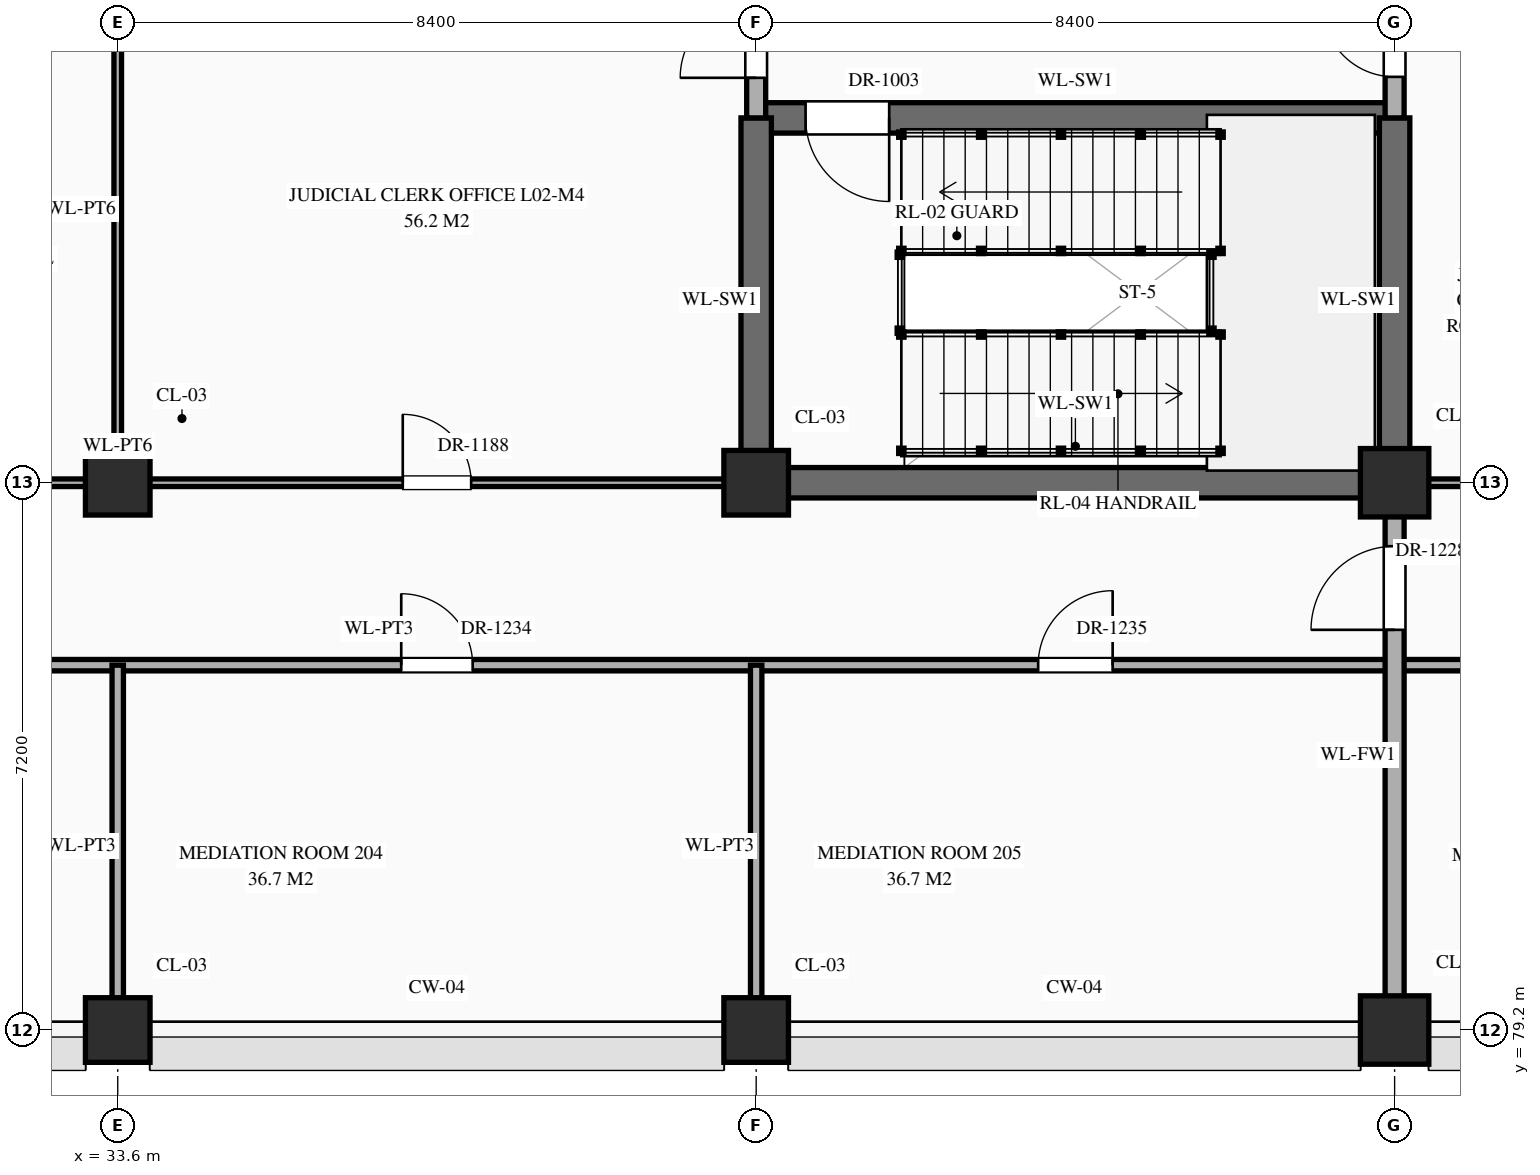
"""IFC4 building model, lengths in metres.
Left out: names, types, materials, properties, quantities, classifications, styles, units other than length and angle.
Written with IfcOpenShell. Run it as: python <this file> out.ifc"""

import sys

from ifc_helpers import new_model, si_unit, direction, frame, frame_2d, origin, origin_2d, place, context, subcontext, project, spatial, rectangle, extrude, element, fill, save


model = new_model("IFC4")
c1 = context("Model", 3, precision=1e-05, world=origin(), true_north=direction((0.0, 1.0)))
c2 = subcontext(c1, "Body", "Model", "MODEL_VIEW")
j1 = project(units=[si_unit("LENGTHUNIT", "METRE"), si_unit("PLANEANGLEUNIT", "RADIAN")], contexts=[c1])
p1 = place(None, origin())
s1 = spatial("IfcSite", under=j1, at=p1, CompositionType="ELEMENT")
p2 = place(p1, origin())
s2 = spatial("IfcBuilding", under=s1, at=p2, CompositionType="ELEMENT")
p3 = place(p2, frame((0.0, 0.0, 5.4)))
s3 = spatial("IfcBuildingStorey", under=s2, at=p3, CompositionType="ELEMENT", Elevation=5.4)
for number, where, z_axis, x_axis in (
    (1, (33.6, 79.2, 0.0), (0.0, 0.0, 1.0), (1.0, 0.0, 0.0)),
    (2, (33.6, 86.4, 0.0), (0.0, 0.0, 1.0), (1.0, 0.0, 0.0)),
    (3, (42.0, 79.2, 0.0), (0.0, 0.0, 1.0), (1.0, 0.0, 0.0)),
    (4, (42.0, 86.4, 0.0), (0.0, 0.0, 1.0), (1.0, 0.0, 0.0)),
):
    element("IfcColumn", number, at=place(p3, frame(where, z_axis=z_axis, x_axis=x_axis)), inside=s3, PredefinedType="COLUMN", context=c2, shape_type="SweptSolid", body=[
        extrude(rectangle(XDim=0.85, YDim=0.85, at=origin_2d()), origin(), (0.0, 0.0, 1.0), 5.4),
    ])
for number, where, z_axis, x_axis in (
    (5, (50.4, 79.2, 0.0), (0.0, 0.0, 1.0), (1.0, 0.0, 0.0)),
    (6, (50.4, 86.4, 0.0), (0.0, 0.0, 1.0), (1.0, 0.0, 0.0)),
):
    element("IfcColumn", number, at=place(p3, frame(where, z_axis=z_axis, x_axis=x_axis)), inside=s3, PredefinedType="COLUMN", context=c2, shape_type="SweptSolid", body=[
        extrude(rectangle(XDim=0.9, YDim=0.9, at=origin_2d()), origin(), (0.0, 0.0, 1.0), 5.4),
    ])
p4 = place(p3, frame((16.8, 84.0, 0.0), z_axis=(0.0, 0.0, 1.0), x_axis=(1.0, 0.0, 0.0)))
e7 = element("IfcWall", 7, at=p4, inside=s3, PredefinedType="STANDARD", context=c2, shape_type="SweptSolid", body=[
    extrude(rectangle(XDim=134.4, YDim=0.15, at=frame_2d((67.2, 0.0))), origin(), (0.0, 0.0, 1.0), 5.12),
])
p5 = place(p4, frame((3.58, 0.0, 0.0)))
e8 = element("IfcOpeningElement", 8, at=p5, cuts=e7, PredefinedType="OPENING", context=c2, shape_type="SweptSolid", body=[
    extrude(rectangle(XDim=1.24, YDim=2.3, at=frame_2d((0.62, 1.15))), frame((0.0, 0.087, 0.0), z_axis=(0.0, -1.0, 0.0), x_axis=(1.0, 0.0, 0.0)), (0.0, 0.0, 1.0), 0.174),
])
p6 = place(p4, frame((11.96, 0.0, 0.0)))
e9 = element("IfcOpeningElement", 9, at=p6, cuts=e7, PredefinedType="OPENING", context=c2, shape_type="SweptSolid", body=[
    extrude(rectangle(XDim=1.28, YDim=2.35, at=frame_2d((0.64, 1.175))), frame((0.0, 0.087, 0.0), z_axis=(0.0, -1.0, 0.0), x_axis=(1.0, 0.0, 0.0)), (0.0, 0.0, 1.0), 0.174),
])
p7 = place(p4, frame((20.53, 0.0, 0.0)))
e10 = element("IfcOpeningElement", 10, at=p7, cuts=e7, PredefinedType="OPENING", context=c2, shape_type="SweptSolid", body=[
    extrude(rectangle(XDim=0.94, YDim=2.3, at=frame_2d((0.47, 1.15))), frame((0.0, 0.087, 0.0), z_axis=(0.0, -1.0, 0.0), x_axis=(1.0, 0.0, 0.0)), (0.0, 0.0, 1.0), 0.174),
])
p8 = place(p4, frame((28.91, 0.0, 0.0)))
e11 = element("IfcOpeningElement", 11, at=p8, cuts=e7, PredefinedType="OPENING", context=c2, shape_type="SweptSolid", body=[
    extrude(rectangle(XDim=0.98, YDim=2.35, at=frame_2d((0.49, 1.175))), frame((0.0, 0.087, 0.0), z_axis=(0.0, -1.0, 0.0), x_axis=(1.0, 0.0, 0.0)), (0.0, 0.0, 1.0), 0.174),
])
p9 = place(p4, frame((37.27, 0.0, 0.0)))
e12 = element("IfcOpeningElement", 12, at=p9, cuts=e7, PredefinedType="OPENING", context=c2, shape_type="SweptSolid", body=[
    extrude(rectangle(XDim=1.06, YDim=2.4, at=frame_2d((0.53, 1.2))), frame((0.0, 0.087, 0.0), z_axis=(0.0, -1.0, 0.0), x_axis=(1.0, 0.0, 0.0)), (0.0, 0.0, 1.0), 0.174),
])
p10 = place(p4, frame((45.63, 0.0, 0.0)))
e13 = element("IfcOpeningElement", 13, at=p10, cuts=e7, PredefinedType="OPENING", context=c2, shape_type="SweptSolid", body=[
    extrude(rectangle(XDim=1.14, YDim=2.4, at=frame_2d((0.57, 1.2))), frame((0.0, 0.087, 0.0), z_axis=(0.0, -1.0, 0.0), x_axis=(1.0, 0.0, 0.0)), (0.0, 0.0, 1.0), 0.174),
])
p11 = place(p4, frame((54.15, 0.0, 0.0)))
e14 = element("IfcOpeningElement", 14, at=p11, cuts=e7, PredefinedType="OPENING", context=c2, shape_type="SweptSolid", body=[
    extrude(rectangle(XDim=0.9, YDim=2.15, at=frame_2d((0.45, 1.075))), frame((0.0, 0.087, 0.0), z_axis=(0.0, -1.0, 0.0), x_axis=(1.0, 0.0, 0.0)), (0.0, 0.0, 1.0), 0.174),
])
p12 = place(p4, frame((62.57, 0.0, 0.0)))
e15 = element("IfcOpeningElement", 15, at=p12, cuts=e7, PredefinedType="OPENING", context=c2, shape_type="SweptSolid", body=[
    extrude(rectangle(XDim=0.86, YDim=2.1, at=frame_2d((0.43, 1.05))), frame((0.0, 0.087, 0.0), z_axis=(0.0, -1.0, 0.0), x_axis=(1.0, 0.0, 0.0)), (0.0, 0.0, 1.0), 0.174),
])
p13 = place(p4, frame((70.92, 0.0, 0.0)))
e16 = element("IfcOpeningElement", 16, at=p13, cuts=e7, PredefinedType="OPENING", context=c2, shape_type="SweptSolid", body=[
    extrude(rectangle(XDim=0.96, YDim=2.2, at=frame_2d((0.48, 1.1))), frame((0.0, 0.087, 0.0), z_axis=(0.0, -1.0, 0.0), x_axis=(1.0, 0.0, 0.0)), (0.0, 0.0, 1.0), 0.174),
])
p14 = place(p4, frame((79.3, 0.0, 0.0)))
e17 = element("IfcOpeningElement", 17, at=p14, cuts=e7, PredefinedType="OPENING", context=c2, shape_type="SweptSolid", body=[
    extrude(rectangle(XDim=1.0, YDim=2.25, at=frame_2d((0.5, 1.125))), frame((0.0, 0.087, 0.0), z_axis=(0.0, -1.0, 0.0), x_axis=(1.0, 0.0, 0.0)), (0.0, 0.0, 1.0), 0.174),
])
p15 = place(p4, frame((87.68, 0.0, 0.0)))
e18 = element("IfcOpeningElement", 18, at=p15, cuts=e7, PredefinedType="OPENING", context=c2, shape_type="SweptSolid", body=[
    extrude(rectangle(XDim=1.04, YDim=2.2, at=frame_2d((0.52, 1.1))), frame((0.0, 0.087, 0.0), z_axis=(0.0, -1.0, 0.0), x_axis=(1.0, 0.0, 0.0)), (0.0, 0.0, 1.0), 0.174),
])
p16 = place(p4, frame((96.06, 0.0, 0.0)))
e19 = element("IfcOpeningElement", 19, at=p16, cuts=e7, PredefinedType="OPENING", context=c2, shape_type="SweptSolid", body=[
    extrude(rectangle(XDim=1.08, YDim=2.25, at=frame_2d((0.54, 1.125))), frame((0.0, 0.087, 0.0), z_axis=(0.0, -1.0, 0.0), x_axis=(1.0, 0.0, 0.0)), (0.0, 0.0, 1.0), 0.174),
])
p17 = place(p4, frame((104.44, 0.0, 0.0)))
e20 = element("IfcOpeningElement", 20, at=p17, cuts=e7, PredefinedType="OPENING", context=c2, shape_type="SweptSolid", body=[
    extrude(rectangle(XDim=1.12, YDim=2.25, at=frame_2d((0.56, 1.125))), frame((0.0, 0.087, 0.0), z_axis=(0.0, -1.0, 0.0), x_axis=(1.0, 0.0, 0.0)), (0.0, 0.0, 1.0), 0.174),
])
p18 = place(p4, frame((112.82, 0.0, 0.0)))
e21 = element("IfcOpeningElement", 21, at=p18, cuts=e7, PredefinedType="OPENING", context=c2, shape_type="SweptSolid", body=[
    extrude(rectangle(XDim=1.16, YDim=2.3, at=frame_2d((0.58, 1.15))), frame((0.0, 0.087, 0.0), z_axis=(0.0, -1.0, 0.0), x_axis=(1.0, 0.0, 0.0)), (0.0, 0.0, 1.0), 0.174),
])
p19 = place(p4, frame((121.2, 0.0, 0.0)))
e22 = element("IfcOpeningElement", 22, at=p19, cuts=e7, PredefinedType="OPENING", context=c2, shape_type="SweptSolid", body=[
    extrude(rectangle(XDim=1.2, YDim=2.35, at=frame_2d((0.6, 1.175))), frame((0.0, 0.087, 0.0), z_axis=(0.0, -1.0, 0.0), x_axis=(1.0, 0.0, 0.0)), (0.0, 0.0, 1.0), 0.174),
])
p20 = place(p4, frame((129.58, 0.0, 0.0)))
e23 = element("IfcOpeningElement", 23, at=p20, cuts=e7, PredefinedType="OPENING", context=c2, shape_type="SweptSolid", body=[
    extrude(rectangle(XDim=1.24, YDim=2.3, at=frame_2d((0.62, 1.15))), frame((0.0, 0.087, 0.0), z_axis=(0.0, -1.0, 0.0), x_axis=(1.0, 0.0, 0.0)), (0.0, 0.0, 1.0), 0.174),
])
p21 = place(p3, frame((25.2, 86.4, 0.0), z_axis=(0.0, 0.0, 1.0), x_axis=(1.0, 0.0, 0.0)))
e24 = element("IfcWall", 24, at=p21, inside=s3, PredefinedType="STANDARD", context=c2, shape_type="SweptSolid", body=[
    extrude(rectangle(XDim=16.8, YDim=0.1, at=frame_2d((8.4, 0.0))), origin(), (0.0, 0.0, 1.0), 4.27),
])
p22 = place(p21, frame((1.083, 0.0, 0.0)))
e25 = element("IfcOpeningElement", 25, at=p22, cuts=e24, PredefinedType="OPENING", context=c2, shape_type="SweptSolid", body=[
    extrude(rectangle(XDim=0.98, YDim=2.35, at=frame_2d((0.49, 1.175))), frame((0.0, 0.062, 0.0), z_axis=(0.0, -1.0, 0.0), x_axis=(1.0, 0.0, 0.0)), (0.0, 0.0, 1.0), 0.124),
])
p23 = place(p21, frame((3.3, 0.0, 0.0)))
e26 = element("IfcOpeningElement", 26, at=p23, cuts=e24, PredefinedType="OPENING", context=c2, shape_type="SweptSolid", body=[
    extrude(rectangle(XDim=1.8, YDim=2.5, at=frame_2d((0.9, 1.25))), frame((0.0, 0.062, 0.0), z_axis=(0.0, -1.0, 0.0), x_axis=(1.0, 0.0, 0.0)), (0.0, 0.0, 1.0), 0.124),
])
p24 = place(p21, frame((6.258, 0.0, 0.0)))
e27 = element("IfcOpeningElement", 27, at=p24, cuts=e24, PredefinedType="OPENING", context=c2, shape_type="SweptSolid", body=[
    extrude(rectangle(XDim=1.14, YDim=2.4, at=frame_2d((0.57, 1.2))), frame((0.0, 0.062, 0.0), z_axis=(0.0, -1.0, 0.0), x_axis=(1.0, 0.0, 0.0)), (0.0, 0.0, 1.0), 0.124),
])
p25 = place(p21, frame((12.15, 0.0, 0.0)))
e28 = element("IfcOpeningElement", 28, at=p25, cuts=e24, PredefinedType="OPENING", context=c2, shape_type="SweptSolid", body=[
    extrude(rectangle(XDim=0.9, YDim=2.15, at=frame_2d((0.45, 1.075))), frame((0.0, 0.062, 0.0), z_axis=(0.0, -1.0, 0.0), x_axis=(1.0, 0.0, 0.0)), (0.0, 0.0, 1.0), 0.124),
])
p26 = place(p3, frame((42.0, 86.4, 0.0), z_axis=(0.0, 0.0, 1.0), x_axis=(1.0, 0.0, 0.0)))
e29 = element("IfcWall", 29, at=p26, inside=s3, PredefinedType="SHEAR", context=c2, shape_type="SweptSolid", body=[
    extrude(rectangle(XDim=8.4, YDim=0.4, at=frame_2d((4.2, 0.0))), origin(), (0.0, 0.0, 1.0), 5.12),
])
p27 = place(p3, frame((50.4, 86.4, 0.0), z_axis=(0.0, 0.0, 1.0), x_axis=(1.0, 0.0, 0.0)))
e30 = element("IfcWall", 30, at=p27, inside=s3, PredefinedType="STANDARD", context=c2, shape_type="SweptSolid", body=[
    extrude(rectangle(XDim=8.4, YDim=0.1, at=frame_2d((4.2, 0.0))), origin(), (0.0, 0.0, 1.0), 4.27),
])
p28 = place(p27, frame((1.125, 0.0, 0.0)))
e31 = element("IfcOpeningElement", 31, at=p28, cuts=e30, PredefinedType="OPENING", context=c2, shape_type="SweptSolid", body=[
    extrude(rectangle(XDim=0.92, YDim=2.15, at=frame_2d((0.46, 1.075))), frame((0.0, 0.062, 0.0), z_axis=(0.0, -1.0, 0.0), x_axis=(1.0, 0.0, 0.0)), (0.0, 0.0, 1.0), 0.124),
])
p29 = place(p27, frame((3.7, 0.0, 0.0)))
e32 = element("IfcOpeningElement", 32, at=p29, cuts=e30, PredefinedType="OPENING", context=c2, shape_type="SweptSolid", body=[
    extrude(rectangle(XDim=1.0, YDim=2.25, at=frame_2d((0.5, 1.125))), frame((0.0, 0.062, 0.0), z_axis=(0.0, -1.0, 0.0), x_axis=(1.0, 0.0, 0.0)), (0.0, 0.0, 1.0), 0.124),
])
p30 = place(p27, frame((6.295, 0.0, 0.0)))
e33 = element("IfcOpeningElement", 33, at=p30, cuts=e30, PredefinedType="OPENING", context=c2, shape_type="SweptSolid", body=[
    extrude(rectangle(XDim=1.04, YDim=2.2, at=frame_2d((0.52, 1.1))), frame((0.0, 0.062, 0.0), z_axis=(0.0, -1.0, 0.0), x_axis=(1.0, 0.0, 0.0)), (0.0, 0.0, 1.0), 0.124),
])
p31 = place(p3, frame((42.0, 91.2, 0.0), z_axis=(0.0, 0.0, 1.0), x_axis=(1.0, 0.0, 0.0)))
e34 = element("IfcWall", 34, at=p31, inside=s3, PredefinedType="SHEAR", context=c2, shape_type="SweptSolid", body=[
    extrude(rectangle(XDim=8.4, YDim=0.4, at=frame_2d((4.2, 0.0))), origin(), (0.0, 0.0, 1.0), 5.12),
])
p32 = place(p31, frame((0.65, 0.0, 0.0)))
e35 = element("IfcOpeningElement", 35, at=p32, cuts=e34, PredefinedType="OPENING", context=c2, shape_type="SweptSolid", body=[
    extrude(rectangle(XDim=1.1, YDim=2.2, at=frame_2d((0.55, 1.1))), frame((0.0, 0.212, 0.0), z_axis=(0.0, -1.0, 0.0), x_axis=(1.0, 0.0, 0.0)), (0.0, 0.0, 1.0), 0.424),
])
p33 = place(p3, frame((33.6, 79.24, 0.0), z_axis=(0.0, 0.0, 1.0), x_axis=(0.0, 1.0, 0.0)))
e36 = element("IfcWall", 36, at=p33, inside=s3, PredefinedType="STANDARD", context=c2, shape_type="SweptSolid", body=[
    extrude(rectangle(XDim=4.76, YDim=0.15, at=frame_2d((2.38, 0.0))), origin(), (0.0, 0.0, 1.0), 4.37),
])
p34 = place(p3, frame((33.6, 86.4, 0.0), z_axis=(0.0, 0.0, 1.0), x_axis=(0.0, 1.0, 0.0)))
e37 = element("IfcWall", 37, at=p34, inside=s3, PredefinedType="STANDARD", context=c2, shape_type="SweptSolid", body=[
    extrude(rectangle(XDim=7.2, YDim=0.1, at=frame_2d((3.6, 0.0))), origin(), (0.0, 0.0, 1.0), 4.37),
])
p35 = place(p3, frame((42.0, 79.24, 0.0), z_axis=(0.0, 0.0, 1.0), x_axis=(0.0, 1.0, 0.0)))
e38 = element("IfcWall", 38, at=p35, inside=s3, PredefinedType="STANDARD", context=c2, shape_type="SweptSolid", body=[
    extrude(rectangle(XDim=4.76, YDim=0.15, at=frame_2d((2.38, 0.0))), origin(), (0.0, 0.0, 1.0), 4.37),
])
p36 = place(p3, frame((42.0, 86.4, 0.0), z_axis=(0.0, 0.0, 1.0), x_axis=(0.0, 1.0, 0.0)))
e39 = element("IfcWall", 39, at=p36, inside=s3, PredefinedType="SHEAR", context=c2, shape_type="SweptSolid", body=[
    extrude(rectangle(XDim=4.8, YDim=0.4, at=frame_2d((2.4, 0.0))), origin(), (0.0, 0.0, 1.0), 5.12),
])
p37 = place(p3, frame((42.0, 91.2, 0.0), z_axis=(0.0, 0.0, 1.0), x_axis=(0.0, 1.0, 0.0)))
e40 = element("IfcWall", 40, at=p37, inside=s3, PredefinedType="STANDARD", context=c2, shape_type="SweptSolid", body=[
    extrude(rectangle(XDim=2.4, YDim=0.25, at=frame_2d((1.2, 0.0))), origin(), (0.0, 0.0, 1.0), 4.37),
])
p38 = place(p37, frame((0.528, 0.0, 0.0)))
e41 = element("IfcOpeningElement", 41, at=p38, cuts=e40, PredefinedType="OPENING", context=c2, shape_type="SweptSolid", body=[
    extrude(rectangle(XDim=1.0, YDim=2.2, at=frame_2d((0.5, 1.1))), frame((0.0, 0.137, 0.0), z_axis=(0.0, -1.0, 0.0), x_axis=(1.0, 0.0, 0.0)), (0.0, 0.0, 1.0), 0.274),
])
p39 = place(p3, frame((50.4, 79.24, 0.0), z_axis=(0.0, 0.0, 1.0), x_axis=(0.0, 1.0, 0.0)))
e42 = element("IfcWall", 42, at=p39, inside=s3, PredefinedType="STANDARD", context=c2, shape_type="SweptSolid", body=[
    extrude(rectangle(XDim=7.16, YDim=0.25, at=frame_2d((3.58, 0.0))), origin(), (0.0, 0.0, 1.0), 4.37),
])
p40 = place(p39, frame((5.225, 0.0, 0.0)))
e43 = element("IfcOpeningElement", 43, at=p40, cuts=e42, PredefinedType="OPENING", context=c2, shape_type="SweptSolid", body=[
    extrude(rectangle(XDim=1.1, YDim=2.2, at=frame_2d((0.55, 1.1))), frame((0.0, 0.137, 0.0), z_axis=(0.0, -1.0, 0.0), x_axis=(1.0, 0.0, 0.0)), (0.0, 0.0, 1.0), 0.274),
])
p41 = place(p3, frame((50.4, 86.4, 0.0), z_axis=(0.0, 0.0, 1.0), x_axis=(0.0, 1.0, 0.0)))
e44 = element("IfcWall", 44, at=p41, inside=s3, PredefinedType="SHEAR", context=c2, shape_type="SweptSolid", body=[
    extrude(rectangle(XDim=4.8, YDim=0.4, at=frame_2d((2.4, 0.0))), origin(), (0.0, 0.0, 1.0), 5.12),
])
p42 = place(p3, frame((50.4, 91.2, 0.0), z_axis=(0.0, 0.0, 1.0), x_axis=(0.0, 1.0, 0.0)))
e45 = element("IfcWall", 45, at=p42, inside=s3, PredefinedType="STANDARD", context=c2, shape_type="SweptSolid", body=[
    extrude(rectangle(XDim=13.2, YDim=0.25, at=frame_2d((6.6, 0.0))), origin(), (0.0, 0.0, 1.0), 4.37),
])
p43 = place(p42, frame((0.54, 0.0, 0.0)))
e46 = element("IfcOpeningElement", 46, at=p43, cuts=e45, PredefinedType="OPENING", context=c2, shape_type="SweptSolid", body=[
    extrude(rectangle(XDim=0.95, YDim=2.15, at=frame_2d((0.475, 1.075))), frame((0.0, 0.137, 0.0), z_axis=(0.0, -1.0, 0.0), x_axis=(1.0, 0.0, 0.0)), (0.0, 0.0, 1.0), 0.274),
])
p44 = place(p42, frame((10.51, 0.0, 0.0)))
e47 = element("IfcOpeningElement", 47, at=p44, cuts=e45, PredefinedType="OPENING", context=c2, shape_type="SweptSolid", body=[
    extrude(rectangle(XDim=0.95, YDim=2.15, at=frame_2d((0.475, 1.075))), frame((0.0, 0.137, 0.0), z_axis=(0.0, -1.0, 0.0), x_axis=(1.0, 0.0, 0.0)), (0.0, 0.0, 1.0), 0.274),
])
p45 = place(p42, frame((3.285, 0.0, 0.0)))
e48 = element("IfcOpeningElement", 48, at=p45, cuts=e45, PredefinedType="OPENING", context=c2, shape_type="SweptSolid", body=[
    extrude(rectangle(XDim=1.0, YDim=2.2, at=frame_2d((0.5, 1.1))), frame((0.0, 0.137, 0.0), z_axis=(0.0, -1.0, 0.0), x_axis=(1.0, 0.0, 0.0)), (0.0, 0.0, 1.0), 0.274),
])
p46 = place(p32, frame((1.1, 0.0, 0.0), z_axis=(0.0, 0.0, 1.0), x_axis=(-1.0, 0.0, 0.0)))
e49 = element("IfcDoor", 49, at=p46, inside=s3, OperationType="SINGLE_SWING_LEFT", PredefinedType="DOOR", context=c2, shape_type="SweptSolid", body=[
    extrude(rectangle(XDim=1.1, YDim=2.2, at=frame_2d((0.55, 1.1))), frame((0.0, 0.025, 0.0), z_axis=(0.0, -1.0, 0.0), x_axis=(1.0, 0.0, 0.0)), (0.0, 0.0, 1.0), 0.05),
])
fill(e35, e49)
p47 = place(p38, origin())
e50 = element("IfcDoor", 50, at=p47, inside=s3, OperationType="SINGLE_SWING_LEFT", PredefinedType="DOOR", context=c2, shape_type="SweptSolid", body=[
    extrude(rectangle(XDim=1.0, YDim=2.2, at=frame_2d((0.5, 1.1))), frame((0.0, 0.025, 0.0), z_axis=(0.0, -1.0, 0.0), x_axis=(1.0, 0.0, 0.0)), (0.0, 0.0, 1.0), 0.05),
])
fill(e41, e50)
p48 = place(p43, origin())
e51 = element("IfcDoor", 51, at=p48, inside=s3, OperationType="SINGLE_SWING_RIGHT", PredefinedType="DOOR", context=c2, shape_type="SweptSolid", body=[
    extrude(rectangle(XDim=0.95, YDim=2.15, at=frame_2d((0.475, 1.075))), frame((0.0, 0.025, 0.0), z_axis=(0.0, -1.0, 0.0), x_axis=(1.0, 0.0, 0.0)), (0.0, 0.0, 1.0), 0.05),
])
fill(e46, e51)
p49 = place(p25, origin())
e52 = element("IfcDoor", 52, at=p49, inside=s3, OperationType="SINGLE_SWING_LEFT", PredefinedType="DOOR", context=c2, shape_type="SweptSolid", body=[
    extrude(rectangle(XDim=0.9, YDim=2.15, at=frame_2d((0.45, 1.075))), frame((0.0, 0.025, 0.0), z_axis=(0.0, -1.0, 0.0), x_axis=(1.0, 0.0, 0.0)), (0.0, 0.0, 1.0), 0.05),
])
fill(e28, e52)
p50 = place(p40, origin())
e53 = element("IfcDoor", 53, at=p50, inside=s3, OperationType="SINGLE_SWING_LEFT", PredefinedType="DOOR", context=c2, shape_type="SweptSolid", body=[
    extrude(rectangle(XDim=1.1, YDim=2.2, at=frame_2d((0.55, 1.1))), frame((0.0, 0.025, 0.0), z_axis=(0.0, -1.0, 0.0), x_axis=(1.0, 0.0, 0.0)), (0.0, 0.0, 1.0), 0.05),
])
fill(e43, e53)
p51 = place(p7, origin())
e54 = element("IfcDoor", 54, at=p51, inside=s3, OperationType="SINGLE_SWING_LEFT", PredefinedType="DOOR", context=c2, shape_type="SweptSolid", body=[
    extrude(rectangle(XDim=0.94, YDim=2.3, at=frame_2d((0.47, 1.15))), frame((0.0, 0.025, 0.0), z_axis=(0.0, -1.0, 0.0), x_axis=(1.0, 0.0, 0.0)), (0.0, 0.0, 1.0), 0.05),
])
fill(e10, e54)
p52 = place(p8, origin())
e55 = element("IfcDoor", 55, at=p52, inside=s3, OperationType="SINGLE_SWING_RIGHT", PredefinedType="DOOR", context=c2, shape_type="SweptSolid", body=[
    extrude(rectangle(XDim=0.98, YDim=2.35, at=frame_2d((0.49, 1.175))), frame((0.0, 0.025, 0.0), z_axis=(0.0, -1.0, 0.0), x_axis=(1.0, 0.0, 0.0)), (0.0, 0.0, 1.0), 0.05),
])
fill(e11, e55)
save(model, sys.argv[1])
